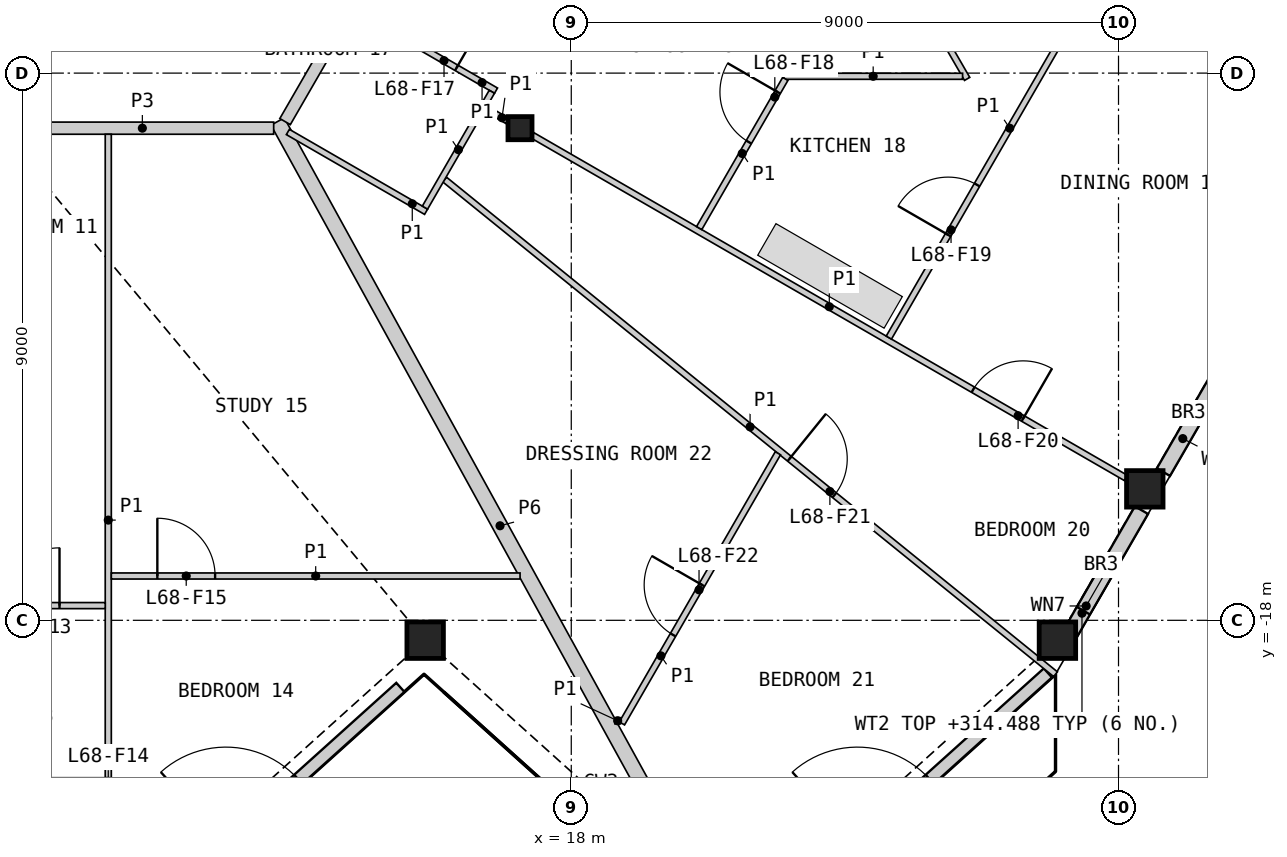
"""IFC4 building model, lengths in metres.
Left out: names, types, materials, properties, quantities, classifications, styles, units other than length and angle.
Written with IfcOpenShell. Run it as: python <this file> out.ifc"""

import sys

from ifc_helpers import new_model, si_unit, direction, frame, frame_2d, origin, origin_2d, place, context, subcontext, project, spatial, rectangle, hollow_rectangle, i_section, extrude, element, fill, save


model = new_model("IFC4")
c1 = context("Model", 3, precision=1e-05, world=origin(), true_north=direction((0.0, 1.0)))
c2 = subcontext(c1, "Body", "Model", "MODEL_VIEW")
j1 = project(units=[si_unit("LENGTHUNIT", "METRE"), si_unit("PLANEANGLEUNIT", "RADIAN")], contexts=[c1])
p1 = place(None, origin())
s1 = spatial("IfcSite", under=j1, at=p1, CompositionType="ELEMENT")
p2 = place(p1, origin())
s2 = spatial("IfcBuilding", under=s1, at=p2, CompositionType="ELEMENT")
p3 = place(p2, frame((0.0, 0.0, 312.0)))
s3 = spatial("IfcBuildingStorey", under=s2, at=p3, CompositionType="ELEMENT", Elevation=312.0)
for number, where, z_axis, x_axis in (
    (1, (15.597, -18.327, 0.0), (0.0, 0.0, 1.0), (1.0, 0.0, 0.0)),
    (2, (25.995, -18.327, 0.0), (0.0, 0.0, 1.0), (1.0, 0.0, 0.0)),
    (3, (27.432, -15.838, 0.0), (0.0, 0.0, 1.0), (1.0, 0.0, 0.0)),
):
    element("IfcColumn", number, at=place(p3, frame(where, z_axis=z_axis, x_axis=x_axis)), inside=s3, PredefinedType="COLUMN", context=c2, shape_type="SweptSolid", body=[
        extrude(hollow_rectangle(XDim=0.6, YDim=0.6, WallThickness=0.04, at=origin_2d()), origin(), (0.0, 0.0, 1.0), 3.4),
    ])
p4 = place(p3, frame((17.157, -9.906, 0.0), z_axis=(0.0, 0.0, 1.0), x_axis=(1.0, 0.0, 0.0)))
e4 = element("IfcColumn", 4, at=p4, inside=s3, PredefinedType="COLUMN", context=c2, shape_type="SweptSolid", body=[
    extrude(i_section(OverallWidth=0.396, OverallDepth=0.381, WebThickness=0.019, FlangeThickness=0.03, at=origin_2d()), origin(), (0.0, 0.0, 1.0), 3.4),
])
p5 = place(p3, frame((10.641, -23.198, 0.0), z_axis=(0.0, 0.0, 1.0), x_axis=(0.743121537674, 0.66915646918, 0.0)))
e5 = element("IfcWall", 5, at=p5, inside=s3, PredefinedType="SOLIDWALL", context=c2, shape_type="SweptSolid", body=[
    extrude(rectangle(XDim=6.12, YDim=0.2, at=frame_2d((3.06, 0.0))), origin(), (0.0, 0.0, 1.0), 2.488),
])
p6 = place(p5, frame((2.26, 0.0, 0.0)))
e6 = element("IfcOpeningElement", 6, at=p6, cuts=e5, PredefinedType="OPENING", context=c2, shape_type="SweptSolid", body=[
    extrude(rectangle(XDim=1.6, YDim=2.25, at=frame_2d((0.8, 1.125))), frame((0.0, 0.11, 0.0), z_axis=(0.0, -1.0, 0.0), x_axis=(1.0, 0.0, 0.0)), (0.0, 0.0, 1.0), 0.22),
])
p7 = place(p3, frame((21.027, -23.198, 0.0), z_axis=(0.0, 0.0, 1.0), x_axis=(0.74314788005, 0.669127213897, 0.0)))
e7 = element("IfcWall", 7, at=p7, inside=s3, PredefinedType="SOLIDWALL", context=c2, shape_type="SweptSolid", body=[
    extrude(rectangle(XDim=6.475, YDim=0.2, at=frame_2d((3.237, 0.0))), origin(), (0.0, 0.0, 1.0), 2.488),
])
p8 = place(p7, frame((2.26, 0.0, 0.0)))
e8 = element("IfcOpeningElement", 8, at=p8, cuts=e7, PredefinedType="OPENING", context=c2, shape_type="SweptSolid", body=[
    extrude(rectangle(XDim=1.6, YDim=2.25, at=frame_2d((0.8, 1.125))), frame((0.0, 0.11, 0.0), z_axis=(0.0, -1.0, 0.0), x_axis=(1.0, 0.0, 0.0)), (0.0, 0.0, 1.0), 0.22),
])
p9 = place(p3, frame((26.073, -18.448, 0.0), z_axis=(0.0, 0.0, 1.0), x_axis=(0.499992367345, 0.866029810455, 0.0)))
e9 = element("IfcWall", 9, at=p9, inside=s3, PredefinedType="SOLIDWALL", context=c2, shape_type="SweptSolid", body=[
    extrude(rectangle(XDim=2.61, YDim=0.25, at=frame_2d((1.305, 0.0))), origin(), (0.0, 0.0, 1.0), 2.488),
])
p10 = place(p9, frame((0.7, 0.0, 1.6)))
e10 = element("IfcOpeningElement", 10, at=p10, cuts=e9, PredefinedType="OPENING", context=c2, shape_type="SweptSolid", body=[
    extrude(rectangle(XDim=0.9, YDim=0.6, at=frame_2d((0.45, 0.3))), frame((0.0, 0.135, 0.0), z_axis=(0.0, -1.0, 0.0), x_axis=(1.0, 0.0, 0.0)), (0.0, 0.0, 1.0), 0.27),
])
p11 = place(p3, frame((27.739, -15.563, 0.0), z_axis=(0.0, 0.0, 1.0), x_axis=(0.500012659481, 0.866018094706, 0.0)))
e11 = element("IfcWall", 11, at=p11, inside=s3, PredefinedType="SOLIDWALL", context=c2, shape_type="SweptSolid", body=[
    extrude(rectangle(XDim=2.549, YDim=0.25, at=frame_2d((1.274, 0.0))), origin(), (0.0, 0.0, 1.0), 2.488),
])
p12 = place(p3, frame((13.171, -9.796, 0.0), z_axis=(0.0, 0.0, 1.0), x_axis=(0.481999020381, -0.876171755053, 0.0)))
e12 = element("IfcWall", 12, at=p12, inside=s3, PredefinedType="PARTITIONING", context=c2, shape_type="SweptSolid", body=[
    extrude(rectangle(XDim=15.178, YDim=0.25, at=frame_2d((7.589, 0.0))), origin(), (0.0, 0.0, 1.0), 2.33),
])
p13 = place(p3, frame((8.786, -9.906, 0.0), z_axis=(0.0, 0.0, 1.0), x_axis=(1.0, 0.0, 0.0)))
e13 = element("IfcWall", 13, at=p13, inside=s3, PredefinedType="PARTITIONING", context=c2, shape_type="SweptSolid", body=[
    extrude(rectangle(XDim=4.32, YDim=0.2, at=frame_2d((2.16, 0.0))), origin(), (0.0, 0.0, 1.0), 3.1),
])
p14 = place(p3, frame((13.293, -9.797, 0.0), z_axis=(0.0, 0.0, 1.0), x_axis=(0.499967746641, 0.866044024469, 0.0)))
e14 = element("IfcWall", 14, at=p14, inside=s3, PredefinedType="PARTITIONING", context=c2, shape_type="SweptSolid", body=[
    extrude(rectangle(XDim=3.676, YDim=0.2, at=frame_2d((1.838, 0.0))), origin(), (0.0, 0.0, 1.0), 3.1),
])
p15 = place(p14, frame((2.426, 0.0, 0.0)))
e15 = element("IfcOpeningElement", 15, at=p15, cuts=e14, PredefinedType="OPENING", context=c2, shape_type="SweptSolid", body=[
    extrude(rectangle(XDim=1.0, YDim=2.1, at=frame_2d((0.5, 1.05))), frame((0.0, 0.11, 0.0), z_axis=(0.0, -1.0, 0.0), x_axis=(1.0, 0.0, 0.0)), (0.0, 0.0, 1.0), 0.22),
])
p16 = place(p3, frame((15.917, -10.751, 0.0), z_axis=(0.0, 0.0, 1.0), x_axis=(0.777149866095, -0.629315569193, 0.0)))
e16 = element("IfcWall", 16, at=p16, inside=s3, PredefinedType="PARTITIONING", context=c2, shape_type="SweptSolid", body=[
    extrude(rectangle(XDim=12.927, YDim=0.1, at=frame_2d((6.464, 0.0))), origin(), (0.0, 0.0, 1.0), 2.33),
])
p17 = place(p16, frame((7.298, 0.0, 0.0)))
e17 = element("IfcOpeningElement", 17, at=p17, cuts=e16, PredefinedType="OPENING", context=c2, shape_type="SweptSolid", body=[
    extrude(rectangle(XDim=0.95, YDim=2.1, at=frame_2d((0.475, 1.05))), frame((0.0, 0.06, 0.0), z_axis=(0.0, -1.0, 0.0), x_axis=(1.0, 0.0, 0.0)), (0.0, 0.0, 1.0), 0.12),
])
p18 = place(p3, frame((10.385, -22.698, 0.0), z_axis=(0.0, 0.0, 1.0), x_axis=(0.0, 1.0, 0.0)))
e18 = element("IfcWall", 18, at=p18, inside=s3, PredefinedType="PARTITIONING", context=c2, shape_type="SweptSolid", body=[
    extrude(rectangle(XDim=12.692, YDim=0.1, at=frame_2d((6.346, 0.0))), origin(), (0.0, 0.0, 1.0), 2.33),
])
p19 = place(p18, frame((1.153, 0.0, 0.0)))
e19 = element("IfcOpeningElement", 19, at=p19, cuts=e18, PredefinedType="OPENING", context=c2, shape_type="SweptSolid", body=[
    extrude(rectangle(XDim=0.95, YDim=2.1, at=frame_2d((0.475, 1.05))), frame((0.0, 0.06, 0.0), z_axis=(0.0, -1.0, 0.0), x_axis=(1.0, 0.0, 0.0)), (0.0, 0.0, 1.0), 0.12),
])
p20 = place(p3, frame((17.365, -10.025, 0.0), z_axis=(0.0, 0.0, 1.0), x_axis=(0.866021046153, -0.500007547564, 0.0)))
e20 = element("IfcWall", 20, at=p20, inside=s3, PredefinedType="PARTITIONING", context=c2, shape_type="SweptSolid", body=[
    extrude(rectangle(XDim=11.267, YDim=0.1, at=frame_2d((5.634, 0.0))), origin(), (0.0, 0.0, 1.0), 2.33),
])
p21 = place(p20, frame((8.364, 0.0, 0.0)))
e21 = element("IfcOpeningElement", 21, at=p21, cuts=e20, PredefinedType="OPENING", context=c2, shape_type="SweptSolid", body=[
    extrude(rectangle(XDim=0.95, YDim=2.1, at=frame_2d((0.475, 1.05))), frame((0.0, 0.06, 0.0), z_axis=(0.0, -1.0, 0.0), x_axis=(1.0, 0.0, 0.0)), (0.0, 0.0, 1.0), 0.12),
])
p22 = place(p3, frame((0.05, -17.758, 0.0), z_axis=(0.0, 0.0, 1.0), x_axis=(1.0, 0.0, 0.0)))
e22 = element("IfcWall", 22, at=p22, inside=s3, PredefinedType="PARTITIONING", context=c2, shape_type="SweptSolid", body=[
    extrude(rectangle(XDim=10.286, YDim=0.1, at=frame_2d((5.143, 0.0))), origin(), (0.0, 0.0, 1.0), 2.33),
])
p23 = place(p22, frame((0.752, 0.0, 0.0)))
e23 = element("IfcOpeningElement", 23, at=p23, cuts=e22, PredefinedType="OPENING", context=c2, shape_type="SweptSolid", body=[
    extrude(rectangle(XDim=0.95, YDim=2.1, at=frame_2d((0.475, 1.05))), frame((0.0, 0.06, 0.0), z_axis=(0.0, -1.0, 0.0), x_axis=(1.0, 0.0, 0.0)), (0.0, 0.0, 1.0), 0.12),
])
p24 = place(p22, frame((8.584, 0.0, 0.0)))
e24 = element("IfcOpeningElement", 24, at=p24, cuts=e22, PredefinedType="OPENING", context=c2, shape_type="SweptSolid", body=[
    extrude(rectangle(XDim=0.95, YDim=2.1, at=frame_2d((0.475, 1.05))), frame((0.0, 0.06, 0.0), z_axis=(0.0, -1.0, 0.0), x_axis=(1.0, 0.0, 0.0)), (0.0, 0.0, 1.0), 0.12),
])
p25 = place(p3, frame((23.223, -13.35, 0.0), z_axis=(0.0, 0.0, 1.0), x_axis=(0.500018284498, 0.866014846967, 0.0)))
e25 = element("IfcWall", 25, at=p25, inside=s3, PredefinedType="PARTITIONING", context=c2, shape_type="SweptSolid", body=[
    extrude(rectangle(XDim=7.953, YDim=0.1, at=frame_2d((3.977, 0.0))), origin(), (0.0, 0.0, 1.0), 2.33),
])
p26 = place(p25, frame((1.951, 0.0, 0.0)))
e26 = element("IfcOpeningElement", 26, at=p26, cuts=e25, PredefinedType="OPENING", context=c2, shape_type="SweptSolid", body=[
    extrude(rectangle(XDim=0.95, YDim=2.1, at=frame_2d((0.475, 1.05))), frame((0.0, 0.06, 0.0), z_axis=(0.0, -1.0, 0.0), x_axis=(1.0, 0.0, 0.0)), (0.0, 0.0, 1.0), 0.12),
])
p27 = place(p3, frame((10.436, -17.271, 0.0), z_axis=(0.0, 0.0, 1.0), x_axis=(1.0, 0.0, 0.0)))
e27 = element("IfcWall", 27, at=p27, inside=s3, PredefinedType="PARTITIONING", context=c2, shape_type="SweptSolid", body=[
    extrude(rectangle(XDim=6.722, YDim=0.1, at=frame_2d((3.361, 0.0))), origin(), (0.0, 0.0, 1.0), 2.33),
])
p28 = place(p27, frame((0.757, 0.0, 0.0)))
e28 = element("IfcOpeningElement", 28, at=p28, cuts=e27, PredefinedType="OPENING", context=c2, shape_type="SweptSolid", body=[
    extrude(rectangle(XDim=0.95, YDim=2.1, at=frame_2d((0.475, 1.05))), frame((0.0, 0.06, 0.0), z_axis=(0.0, -1.0, 0.0), x_axis=(1.0, 0.0, 0.0)), (0.0, 0.0, 1.0), 0.12),
])
p29 = place(p3, frame((18.833, -19.695, 0.0), z_axis=(0.0, 0.0, 1.0), x_axis=(0.500034163155, 0.866005678779, 0.0)))
e29 = element("IfcWall", 29, at=p29, inside=s3, PredefinedType="PARTITIONING", context=c2, shape_type="SweptSolid", body=[
    extrude(rectangle(XDim=5.13, YDim=0.1, at=frame_2d((2.565, 0.0))), origin(), (0.0, 0.0, 1.0), 2.33),
])
p30 = place(p29, frame((1.681, 0.0, 0.0)))
e30 = element("IfcOpeningElement", 30, at=p30, cuts=e29, PredefinedType="OPENING", context=c2, shape_type="SweptSolid", body=[
    extrude(rectangle(XDim=0.95, YDim=2.1, at=frame_2d((0.475, 1.05))), frame((0.0, 0.06, 0.0), z_axis=(0.0, -1.0, 0.0), x_axis=(1.0, 0.0, 0.0)), (0.0, 0.0, 1.0), 0.12),
])
p31 = place(p3, frame((22.986, -6.454, 0.0), z_axis=(0.0, 0.0, 1.0), x_axis=(0.499978833458, -0.866037623948, 0.0)))
e31 = element("IfcWall", 31, at=p31, inside=s3, PredefinedType="PARTITIONING", context=c2, shape_type="SweptSolid", body=[
    extrude(rectangle(XDim=3.05, YDim=0.1, at=frame_2d((1.525, 0.0))), origin(), (0.0, 0.0, 1.0), 2.33),
])
p32 = place(p3, frame((21.495, -9.052, 0.0), z_axis=(0.0, 0.0, 1.0), x_axis=(1.0, 0.0, 0.0)))
e32 = element("IfcWall", 32, at=p32, inside=s3, PredefinedType="PARTITIONING", context=c2, shape_type="SweptSolid", body=[
    extrude(rectangle(XDim=2.94, YDim=0.1, at=frame_2d((1.47, 0.0))), origin(), (0.0, 0.0, 1.0), 2.33),
])
p33 = place(p3, frame((20.104, -11.549, 0.0), z_axis=(0.0, 0.0, 1.0), x_axis=(0.499976073514, 0.866039217307, 0.0)))
e33 = element("IfcWall", 33, at=p33, inside=s3, PredefinedType="PARTITIONING", context=c2, shape_type="SweptSolid", body=[
    extrude(rectangle(XDim=2.833, YDim=0.1, at=frame_2d((1.417, 0.0))), origin(), (0.0, 0.0, 1.0), 2.33),
])
p34 = place(p33, frame((1.633, 0.0, 0.0)))
e34 = element("IfcOpeningElement", 34, at=p34, cuts=e33, PredefinedType="OPENING", context=c2, shape_type="SweptSolid", body=[
    extrude(rectangle(XDim=0.95, YDim=2.1, at=frame_2d((0.475, 1.05))), frame((0.0, 0.06, 0.0), z_axis=(0.0, -1.0, 0.0), x_axis=(1.0, 0.0, 0.0)), (0.0, 0.0, 1.0), 0.12),
])
p35 = place(p3, frame((14.468, -7.964, 0.0), z_axis=(0.0, 0.0, 1.0), x_axis=(0.865989200783, -0.500062700197, 0.0)))
e35 = element("IfcWall", 35, at=p35, inside=s3, PredefinedType="PARTITIONING", context=c2, shape_type="SweptSolid", body=[
    extrude(rectangle(XDim=2.65, YDim=0.1, at=frame_2d((1.325, 0.0))), origin(), (0.0, 0.0, 1.0), 2.33),
])
p36 = place(p35, frame((0.95, 0.0, 0.0)))
e36 = element("IfcOpeningElement", 36, at=p36, cuts=e35, PredefinedType="OPENING", context=c2, shape_type="SweptSolid", body=[
    extrude(rectangle(XDim=0.95, YDim=2.1, at=frame_2d((0.475, 1.05))), frame((0.0, 0.06, 0.0), z_axis=(0.0, -1.0, 0.0), x_axis=(1.0, 0.0, 0.0)), (0.0, 0.0, 1.0), 0.12),
])
p37 = place(p3, frame((13.339, -9.968, 0.0), z_axis=(0.0, 0.0, 1.0), x_axis=(0.866013657776, -0.500020344131, 0.0)))
e37 = element("IfcWall", 37, at=p37, inside=s3, PredefinedType="PARTITIONING", context=c2, shape_type="SweptSolid", body=[
    extrude(rectangle(XDim=2.625, YDim=0.1, at=frame_2d((1.312, 0.0))), origin(), (0.0, 0.0, 1.0), 2.33),
])
p38 = place(p3, frame((15.594, -11.212, 0.0), z_axis=(0.0, 0.0, 1.0), x_axis=(0.499981787252, 0.866035918664, 0.0)))
e38 = element("IfcWall", 38, at=p38, inside=s3, PredefinedType="PARTITIONING", context=c2, shape_type="SweptSolid", body=[
    extrude(rectangle(XDim=2.2, YDim=0.1, at=frame_2d((1.1, 0.0))), origin(), (0.0, 0.0, 1.0), 2.33),
])
p39 = place(p3, frame((16.594, -9.581, 0.0), z_axis=(0.0, 0.0, 1.0), x_axis=(0.866036909293, -0.499980071345, 0.0)))
e39 = element("IfcWall", 39, at=p39, inside=s3, PredefinedType="PARTITIONING", context=c2, shape_type="SweptSolid", body=[
    extrude(rectangle(XDim=0.41, YDim=0.1, at=frame_2d((0.205, 0.0))), origin(), (0.0, 0.0, 1.0), 2.33),
])
p40 = place(p3, frame((18.718, -19.652, 0.0), z_axis=(0.0, 0.0, 1.0), x_axis=(1.0, 0.0, 0.0)))
e40 = element("IfcWall", 40, at=p40, inside=s3, PredefinedType="PARTITIONING", context=c2, shape_type="SweptSolid", body=[
    extrude(rectangle(XDim=0.09, YDim=0.1, at=frame_2d((0.045, 0.0))), origin(), (0.0, 0.0, 1.0), 2.33),
])
p41 = place(p10, origin())
e41 = element("IfcWindow", 41, at=p41, inside=s3, PartitioningType="SINGLE_PANEL", PredefinedType="WINDOW", context=c2, shape_type="SweptSolid", body=[
    extrude(rectangle(XDim=0.9, YDim=0.6, at=frame_2d((0.45, 0.3))), frame((0.0, 0.03, 0.0), z_axis=(0.0, -1.0, 0.0), x_axis=(1.0, 0.0, 0.0)), (0.0, 0.0, 1.0), 0.06),
])
fill(e10, e41)
p42 = place(p24, origin())
e42 = element("IfcDoor", 42, at=p42, inside=s3, OperationType="SINGLE_SWING_RIGHT", PredefinedType="DOOR", context=c2, shape_type="SweptSolid", body=[
    extrude(rectangle(XDim=0.95, YDim=2.1, at=frame_2d((0.475, 1.05))), frame((0.0, 0.025, 0.0), z_axis=(0.0, -1.0, 0.0), x_axis=(1.0, 0.0, 0.0)), (0.0, 0.0, 1.0), 0.05),
])
fill(e24, e42)
p43 = place(p28, origin())
e43 = element("IfcDoor", 43, at=p43, inside=s3, OperationType="SINGLE_SWING_LEFT", PredefinedType="DOOR", context=c2, shape_type="SweptSolid", body=[
    extrude(rectangle(XDim=0.95, YDim=2.1, at=frame_2d((0.475, 1.05))), frame((0.0, 0.025, 0.0), z_axis=(0.0, -1.0, 0.0), x_axis=(1.0, 0.0, 0.0)), (0.0, 0.0, 1.0), 0.05),
])
fill(e28, e43)
p44 = place(p36, origin())
e44 = element("IfcDoor", 44, at=p44, inside=s3, OperationType="SINGLE_SWING_RIGHT", PredefinedType="DOOR", context=c2, shape_type="SweptSolid", body=[
    extrude(rectangle(XDim=0.95, YDim=2.1, at=frame_2d((0.475, 1.05))), frame((0.0, 0.025, 0.0), z_axis=(0.0, -1.0, 0.0), x_axis=(1.0, 0.0, 0.0)), (0.0, 0.0, 1.0), 0.05),
])
fill(e36, e44)
p45 = place(p34, origin())
e45 = element("IfcDoor", 45, at=p45, inside=s3, OperationType="SINGLE_SWING_RIGHT", PredefinedType="DOOR", context=c2, shape_type="SweptSolid", body=[
    extrude(rectangle(XDim=0.95, YDim=2.1, at=frame_2d((0.475, 1.05))), frame((0.0, 0.025, 0.0), z_axis=(0.0, -1.0, 0.0), x_axis=(1.0, 0.0, 0.0)), (0.0, 0.0, 1.0), 0.05),
])
fill(e34, e45)
p46 = place(p26, origin())
e46 = element("IfcDoor", 46, at=p46, inside=s3, OperationType="SINGLE_SWING_LEFT", PredefinedType="DOOR", context=c2, shape_type="SweptSolid", body=[
    extrude(rectangle(XDim=0.95, YDim=2.1, at=frame_2d((0.475, 1.05))), frame((0.0, 0.025, 0.0), z_axis=(0.0, -1.0, 0.0), x_axis=(1.0, 0.0, 0.0)), (0.0, 0.0, 1.0), 0.05),
])
fill(e26, e46)
p47 = place(p21, origin())
e47 = element("IfcDoor", 47, at=p47, inside=s3, OperationType="SINGLE_SWING_RIGHT", PredefinedType="DOOR", context=c2, shape_type="SweptSolid", body=[
    extrude(rectangle(XDim=0.95, YDim=2.1, at=frame_2d((0.475, 1.05))), frame((0.0, 0.025, 0.0), z_axis=(0.0, -1.0, 0.0), x_axis=(1.0, 0.0, 0.0)), (0.0, 0.0, 1.0), 0.05),
])
fill(e21, e47)
p48 = place(p17, origin())
e48 = element("IfcDoor", 48, at=p48, inside=s3, OperationType="SINGLE_SWING_LEFT", PredefinedType="DOOR", context=c2, shape_type="SweptSolid", body=[
    extrude(rectangle(XDim=0.95, YDim=2.1, at=frame_2d((0.475, 1.05))), frame((0.0, 0.025, 0.0), z_axis=(0.0, -1.0, 0.0), x_axis=(1.0, 0.0, 0.0)), (0.0, 0.0, 1.0), 0.05),
])
fill(e17, e48)
p49 = place(p30, origin())
e49 = element("IfcDoor", 49, at=p49, inside=s3, OperationType="SINGLE_SWING_RIGHT", PredefinedType="DOOR", context=c2, shape_type="SweptSolid", body=[
    extrude(rectangle(XDim=0.95, YDim=2.1, at=frame_2d((0.475, 1.05))), frame((0.0, 0.025, 0.0), z_axis=(0.0, -1.0, 0.0), x_axis=(1.0, 0.0, 0.0)), (0.0, 0.0, 1.0), 0.05),
])
fill(e30, e49)
save(model, sys.argv[1])
